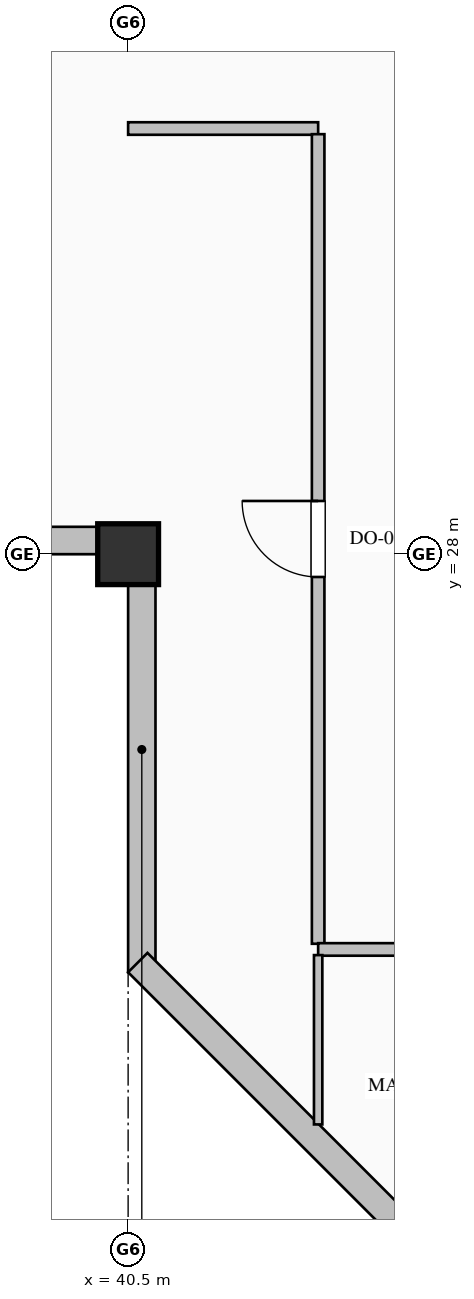
"""IFC4 building model, lengths in metres.
Left out: names, types, materials, properties, quantities, classifications, styles, units other than length and angle.
Written with IfcOpenShell. Run it as: python <this file> out.ifc"""

import sys

from ifc_helpers import new_model, si_unit, direction, frame, frame_2d, origin, origin_2d, place, context, subcontext, project, spatial, rectangle, hollow_rectangle, extrude, element, fill, save


model = new_model("IFC4")
c1 = context("Model", 3, precision=1e-05, world=origin(), true_north=direction((0.0, 1.0)))
c2 = subcontext(c1, "Body", "Model", "MODEL_VIEW")
j1 = project(units=[si_unit("LENGTHUNIT", "METRE"), si_unit("PLANEANGLEUNIT", "RADIAN")], contexts=[c1])
p1 = place(None, origin())
s1 = spatial("IfcSite", under=j1, at=p1, CompositionType="ELEMENT")
p2 = place(p1, origin())
s2 = spatial("IfcBuilding", under=s1, at=p2, CompositionType="ELEMENT")
p3 = place(p2, frame((0.0, 0.0, 311.2)))
s3 = spatial("IfcBuildingStorey", under=s2, at=p3, CompositionType="ELEMENT", Elevation=311.2)
p4 = place(p3, frame((40.5, 28.0, 0.0), z_axis=(0.0, 0.0, 1.0), x_axis=(1.0, 0.0, 0.0)))
e1 = element("IfcColumn", 1, at=p4, inside=s3, PredefinedType="COLUMN", context=c2, shape_type="SweptSolid", body=[
    extrude(hollow_rectangle(XDim=0.8, YDim=0.8, WallThickness=0.032, at=origin_2d()), origin(), (0.0, 0.0, 1.0), 4.0),
])
p5 = place(p3, frame((40.68, 22.5, 0.0), z_axis=(0.0, 0.0, 1.0), x_axis=(0.0, 1.0, 0.0)))
e2 = element("IfcWall", 2, at=p5, inside=s3, PredefinedType="SOLIDWALL", context=c2, shape_type="SweptSolid", body=[
    extrude(rectangle(XDim=5.86, YDim=0.36, at=frame_2d((2.93, 0.0))), origin(), (0.0, 0.0, 1.0), 3.185),
])
p6 = place(p3, frame((40.52, 28.18, 0.0), z_axis=(0.0, 0.0, 1.0), x_axis=(-1.0, 0.0, 0.0)))
e3 = element("IfcWall", 3, at=p6, inside=s3, PredefinedType="SOLIDWALL", context=c2, shape_type="SweptSolid", body=[
    extrude(rectangle(XDim=20.02, YDim=0.36, at=frame_2d((10.01, 0.0))), origin(), (0.0, 0.0, 1.0), 3.185),
])
p7 = place(p6, frame((3.075, 0.0, 0.8)))
e4 = element("IfcOpeningElement", 4, at=p7, cuts=e3, PredefinedType="OPENING", context=c2, shape_type="SweptSolid", body=[
    extrude(rectangle(XDim=1.05, YDim=2.15, at=frame_2d((0.525, 1.075))), frame((0.0, 0.19, 0.0), z_axis=(0.0, -1.0, 0.0), x_axis=(1.0, 0.0, 0.0)), (0.0, 0.0, 1.0), 0.38),
])
p8 = place(p6, frame((10.325, 0.0, 0.9)))
e5 = element("IfcOpeningElement", 5, at=p8, cuts=e3, PredefinedType="OPENING", context=c2, shape_type="SweptSolid", body=[
    extrude(rectangle(XDim=0.95, YDim=1.85, at=frame_2d((0.475, 0.925))), frame((0.0, 0.19, 0.0), z_axis=(0.0, -1.0, 0.0), x_axis=(1.0, 0.0, 0.0)), (0.0, 0.0, 1.0), 0.38),
])
p9 = place(p6, frame((13.875, 0.0, 0.8)))
e6 = element("IfcOpeningElement", 6, at=p9, cuts=e3, PredefinedType="OPENING", context=c2, shape_type="SweptSolid", body=[
    extrude(rectangle(XDim=1.05, YDim=2.15, at=frame_2d((0.525, 1.075))), frame((0.0, 0.19, 0.0), z_axis=(0.0, -1.0, 0.0), x_axis=(1.0, 0.0, 0.0)), (0.0, 0.0, 1.0), 0.38),
])
p10 = place(p3, frame((44.627, 18.627, 0.0), z_axis=(0.0, 0.0, 1.0), x_axis=(-0.707106781187, 0.707106781187, 0.0)))
e7 = element("IfcWall", 7, at=p10, inside=s3, PredefinedType="SOLIDWALL", context=c2, shape_type="SweptSolid", body=[
    extrude(rectangle(XDim=5.657, YDim=0.36, at=frame_2d((2.828, 0.0))), origin(), (0.0, 0.0, 1.0), 3.785),
])
p11 = place(p3, frame((43.0, 33.6, 0.0), z_axis=(0.0, 0.0, 1.0), x_axis=(-1.0, 0.0, 0.0)))
e8 = element("IfcWall", 8, at=p11, inside=s3, PredefinedType="PARTITIONING", context=c2, shape_type="SweptSolid", body=[
    extrude(rectangle(XDim=2.5, YDim=0.165, at=frame_2d((1.25, 0.0))), origin(), (0.0, 0.0, 1.0), 3.785),
])
p12 = place(p3, frame((43.0, 22.875, 0.0), z_axis=(0.0, 0.0, 1.0), x_axis=(0.0, 1.0, 0.0)))
e9 = element("IfcWall", 9, at=p12, inside=s3, PredefinedType="PARTITIONING", context=c2, shape_type="SweptSolid", body=[
    extrude(rectangle(XDim=10.651, YDim=0.165, at=frame_2d((5.325, 0.0))), origin(), (0.0, 0.0, 1.0), 3.785),
])
p13 = place(p12, frame((4.825, 0.0, 0.0)))
e10 = element("IfcOpeningElement", 10, at=p13, cuts=e9, PredefinedType="OPENING", context=c2, shape_type="SweptSolid", body=[
    extrude(rectangle(XDim=1.0, YDim=2.15, at=frame_2d((0.5, 1.075))), frame((0.0, 0.093, 0.0), z_axis=(0.0, -1.0, 0.0), x_axis=(1.0, 0.0, 0.0)), (0.0, 0.0, 1.0), 0.185),
])
p14 = place(p3, frame((45.2, 22.8, 0.0), z_axis=(0.0, 0.0, 1.0), x_axis=(-1.0, 0.0, 0.0)))
e11 = element("IfcWall", 11, at=p14, inside=s3, PredefinedType="PARTITIONING", context=c2, shape_type="SweptSolid", body=[
    extrude(rectangle(XDim=2.2, YDim=0.165, at=frame_2d((1.1, 0.0))), origin(), (0.0, 0.0, 1.0), 3.785),
])
p15 = place(p3, frame((43.0, 22.726, 0.0), z_axis=(0.0, 0.0, 1.0), x_axis=(0.0, -1.0, 0.0)))
e12 = element("IfcWall", 12, at=p15, inside=s3, PredefinedType="MOVABLE", context=c2, shape_type="SweptSolid", body=[
    extrude(rectangle(XDim=2.228, YDim=0.11, at=frame_2d((1.114, 0.0))), origin(), (0.0, 0.0, 1.0), 3.785),
])
p16 = place(p13, origin())
e13 = element("IfcDoor", 13, at=p16, inside=s3, OperationType="SINGLE_SWING_RIGHT", PredefinedType="DOOR", context=c2, shape_type="SweptSolid", body=[
    extrude(rectangle(XDim=1.0, YDim=2.15, at=frame_2d((0.5, 1.075))), frame((0.0, 0.025, 0.0), z_axis=(0.0, -1.0, 0.0), x_axis=(1.0, 0.0, 0.0)), (0.0, 0.0, 1.0), 0.05),
])
fill(e10, e13)
save(model, sys.argv[1])
